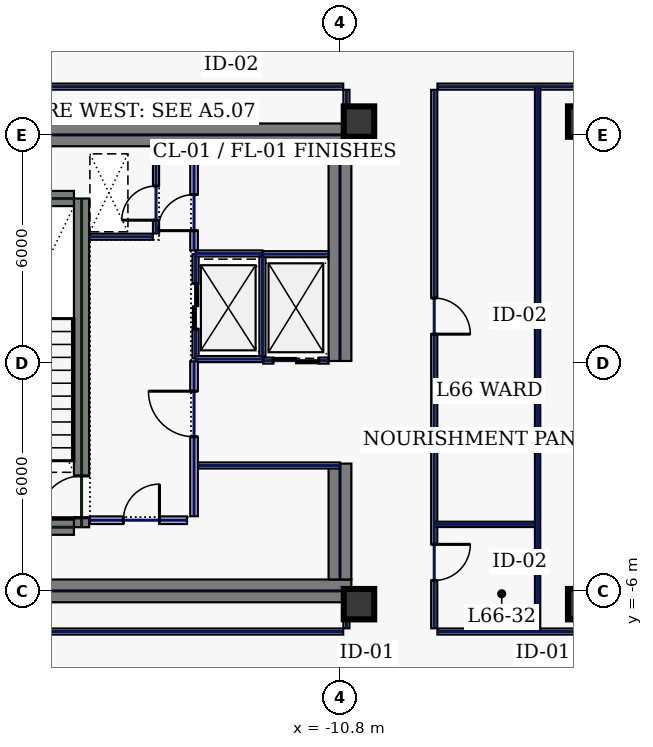
"""IFC4 building model, lengths in metres.
Left out: names, types, materials, properties, quantities, classifications, styles, units other than length and angle.
Written with IfcOpenShell. Run it as: python <this file> out.ifc"""

import sys

from ifc_helpers import new_model, si_unit, direction, frame, frame_2d, origin, origin_2d, place, context, subcontext, project, spatial, rectangle, hollow_rectangle, extrude, element, fill, save


model = new_model("IFC4")
c1 = context("Model", 3, precision=1e-05, world=origin(), true_north=direction((0.0, 1.0)))
c2 = subcontext(c1, "Body", "Model", "MODEL_VIEW")
j1 = project(units=[si_unit("LENGTHUNIT", "METRE"), si_unit("PLANEANGLEUNIT", "RADIAN")], contexts=[c1])
p1 = place(None, origin())
s1 = spatial("IfcSite", under=j1, at=p1, CompositionType="ELEMENT")
p2 = place(p1, origin())
s2 = spatial("IfcBuilding", under=s1, at=p2, CompositionType="ELEMENT")
p3 = place(p2, frame((0.0, 0.0, 285.0)))
s3 = spatial("IfcBuildingStorey", under=s2, at=p3, CompositionType="ELEMENT", Elevation=285.0)
for number, where, z_axis, x_axis in (
    (1, (-22.0, 6.0, 0.0), (0.0, 0.0, 1.0), (1.0, 0.0, 0.0)),
    (2, (-22.0, -6.0, 0.0), (0.0, 0.0, 1.0), (1.0, 0.0, 0.0)),
):
    element("IfcWall", number, at=place(p3, frame(where, z_axis=z_axis, x_axis=x_axis)), inside=s3, PredefinedType="SHEAR", context=c2, shape_type="SweptSolid", body=[
        extrude(rectangle(XDim=11.5, YDim=0.6, at=frame_2d((5.75, 0.0))), origin(), (0.0, 0.0, 1.0), 3.74),
    ])
p4 = place(p3, frame((-10.8, -5.7, 0.0), z_axis=(0.0, 0.0, 1.0), x_axis=(0.0, 1.0, 0.0)))
e3 = element("IfcWall", 3, at=p4, inside=s3, PredefinedType="SHEAR", context=c2, shape_type="SweptSolid", body=[
    extrude(rectangle(XDim=3.05, YDim=0.6, at=frame_2d((1.525, 0.0))), origin(), (0.0, 0.0, 1.0), 3.74),
])
p5 = place(p3, frame((-10.8, 0.05, 0.0), z_axis=(0.0, 0.0, 1.0), x_axis=(0.0, 1.0, 0.0)))
e4 = element("IfcWall", 4, at=p5, inside=s3, PredefinedType="SHEAR", context=c2, shape_type="SweptSolid", body=[
    extrude(rectangle(XDim=5.65, YDim=0.6, at=frame_2d((2.825, 0.0))), origin(), (0.0, 0.0, 1.0), 3.74),
])
p6 = place(p3, frame((-17.6, -4.325, 0.0), z_axis=(0.0, 0.0, 1.0), x_axis=(0.0, 1.0, 0.0)))
e5 = element("IfcWall", 5, at=p6, inside=s3, PredefinedType="SHEAR", context=c2, shape_type="SweptSolid", body=[
    extrude(rectangle(XDim=8.65, YDim=0.4, at=frame_2d((4.325, 0.0))), origin(), (0.0, 0.0, 1.0), 3.74),
])
p7 = place(p6, frame((0.25, 0.0, 0.0)))
e6 = element("IfcOpeningElement", 6, at=p7, cuts=e5, PredefinedType="OPENING", context=c2, shape_type="SweptSolid", body=[
    extrude(rectangle(XDim=1.1, YDim=2.2, at=frame_2d((0.55, 1.1))), frame((0.0, 0.21, 0.0), z_axis=(0.0, -1.0, 0.0), x_axis=(1.0, 0.0, 0.0)), (0.0, 0.0, 1.0), 0.42),
])
for number, where, z_axis, x_axis in (
    (7, (-21.2, -4.325, 0.0), (0.0, 0.0, 1.0), (1.0, 0.0, 0.0)),
    (8, (-21.2, 4.325, 0.0), (0.0, 0.0, 1.0), (1.0, 0.0, 0.0)),
):
    element("IfcWall", number, at=place(p3, frame(where, z_axis=z_axis, x_axis=x_axis)), inside=s3, PredefinedType="SHEAR", context=c2, shape_type="SweptSolid", body=[
        extrude(rectangle(XDim=3.4, YDim=0.4, at=frame_2d((1.7, 0.0))), origin(), (0.0, 0.0, 1.0), 3.74),
    ])
for number, where, z_axis, x_axis in (
    (9, (-10.3, -6.35, 0.0), (0.0, 0.0, 1.0), (1.0, 0.0, 0.0)),
    (10, (-10.3, 6.35, 0.0), (0.0, 0.0, 1.0), (1.0, 0.0, 0.0)),
    (11, (-4.4, -6.35, 0.0), (0.0, 0.0, 1.0), (1.0, 0.0, 0.0)),
    (12, (-4.4, 6.35, 0.0), (0.0, 0.0, 1.0), (1.0, 0.0, 0.0)),
):
    element("IfcColumn", number, at=place(p3, frame(where, z_axis=z_axis, x_axis=x_axis)), inside=s3, PredefinedType="COLUMN", context=c2, shape_type="SweptSolid", body=[
        extrude(hollow_rectangle(XDim=0.8, YDim=0.8, WallThickness=0.036, at=origin_2d()), origin(), (0.0, 0.0, 1.0), 3.74),
    ])
p8 = place(p3, frame((-14.6, 0.12, 0.0), z_axis=(0.0, 0.0, 1.0), x_axis=(0.0, 1.0, 0.0)))
e13 = element("IfcWall", 13, at=p8, inside=s3, PredefinedType="PARTITIONING", context=c2, shape_type="SweptSolid", body=[
    extrude(rectangle(XDim=2.74, YDim=0.16, at=frame_2d((1.37, 0.0))), origin(), (0.0, 0.0, 1.0), 3.74),
])
p9 = place(p8, frame((0.77, 0.0, 0.0)))
e14 = element("IfcOpeningElement", 14, at=p9, cuts=e13, PredefinedType="OPENING", context=c2, shape_type="SweptSolid", body=[
    extrude(rectangle(XDim=1.2, YDim=2.2, at=frame_2d((0.6, 1.1))), frame((0.0, 0.09, 0.0), z_axis=(0.0, -1.0, 0.0), x_axis=(1.0, 0.0, 0.0)), (0.0, 0.0, 1.0), 0.18),
])
for number, where, z_axis, x_axis in (
    (15, (-14.6, 0.1, 0.0), (0.0, 0.0, 1.0), (1.0, 0.0, 0.0)),
    (16, (-14.6, 2.88, 0.0), (0.0, 0.0, 1.0), (1.0, 0.0, 0.0)),
):
    element("IfcWall", number, at=place(p3, frame(where, z_axis=z_axis, x_axis=x_axis)), inside=s3, PredefinedType="PARTITIONING", context=c2, shape_type="SweptSolid", body=[
        extrude(rectangle(XDim=1.76, YDim=0.16, at=frame_2d((0.88, 0.0))), origin(), (0.0, 0.0, 1.0), 3.74),
    ])
p10 = place(p3, frame((-12.84, 0.18, 0.0), z_axis=(0.0, 0.0, 1.0), x_axis=(0.0, 1.0, 0.0)))
e17 = element("IfcWall", 17, at=p10, inside=s3, PredefinedType="PARTITIONING", context=c2, shape_type="SweptSolid", body=[
    extrude(rectangle(XDim=2.62, YDim=0.16, at=frame_2d((1.31, 0.0))), origin(), (0.0, 0.0, 1.0), 3.74),
])
p11 = place(p3, frame((-12.82, 0.06, 0.0), z_axis=(0.0, 0.0, 1.0), x_axis=(1.0, 0.0, 0.0)))
e18 = element("IfcWall", 18, at=p11, inside=s3, PredefinedType="PARTITIONING", context=c2, shape_type="SweptSolid", body=[
    extrude(rectangle(XDim=1.72, YDim=0.16, at=frame_2d((0.86, 0.0))), origin(), (0.0, 0.0, 1.0), 3.74),
])
p12 = place(p11, frame((0.26, 0.0, 0.0)))
e19 = element("IfcOpeningElement", 19, at=p12, cuts=e18, PredefinedType="OPENING", context=c2, shape_type="SweptSolid", body=[
    extrude(rectangle(XDim=1.2, YDim=2.2, at=frame_2d((0.6, 1.1))), frame((0.0, 0.09, 0.0), z_axis=(0.0, -1.0, 0.0), x_axis=(1.0, 0.0, 0.0)), (0.0, 0.0, 1.0), 0.18),
])
p13 = place(p3, frame((-12.82, 2.86, 0.0), z_axis=(0.0, 0.0, 1.0), x_axis=(1.0, 0.0, 0.0)))
e20 = element("IfcWall", 20, at=p13, inside=s3, PredefinedType="PARTITIONING", context=c2, shape_type="SweptSolid", body=[
    extrude(rectangle(XDim=1.72, YDim=0.16, at=frame_2d((0.86, 0.0))), origin(), (0.0, 0.0, 1.0), 3.74),
])
p14 = place(p3, frame((-15.64, 3.405, 0.0), z_axis=(0.0, 0.0, 1.0), x_axis=(0.0, 1.0, 0.0)))
e21 = element("IfcWall", 21, at=p14, inside=s3, PredefinedType="PARTITIONING", context=c2, shape_type="SweptSolid", body=[
    extrude(rectangle(XDim=2.155, YDim=0.16, at=frame_2d((1.078, 0.0))), origin(), (0.0, 0.0, 1.0), 3.74),
])
p15 = place(p14, frame((0.35, 0.0, 0.0)))
e22 = element("IfcOpeningElement", 22, at=p15, cuts=e21, PredefinedType="OPENING", context=c2, shape_type="SweptSolid", body=[
    extrude(rectangle(XDim=0.9, YDim=2.2, at=frame_2d((0.45, 1.1))), frame((0.0, 0.09, 0.0), z_axis=(0.0, -1.0, 0.0), x_axis=(1.0, 0.0, 0.0)), (0.0, 0.0, 1.0), 0.18),
])
p16 = place(p3, frame((-17.38, 3.32, 0.0), z_axis=(0.0, 0.0, 1.0), x_axis=(1.0, 0.0, 0.0)))
e23 = element("IfcWall", 23, at=p16, inside=s3, PredefinedType="PARTITIONING", context=c2, shape_type="SweptSolid", body=[
    extrude(rectangle(XDim=1.655, YDim=0.16, at=frame_2d((0.827, 0.0))), origin(), (0.0, 0.0, 1.0), 3.74),
])
p17 = place(p3, frame((-17.38, -4.14, 0.0), z_axis=(0.0, 0.0, 1.0), x_axis=(1.0, 0.0, 0.0)))
e24 = element("IfcWall", 24, at=p17, inside=s3, PredefinedType="SOLIDWALL", context=c2, shape_type="SweptSolid", body=[
    extrude(rectangle(XDim=2.555, YDim=0.2, at=frame_2d((1.277, 0.0))), origin(), (0.0, 0.0, 1.0), 3.74),
])
p18 = place(p17, frame((0.88, 0.0, 0.0)))
e25 = element("IfcOpeningElement", 25, at=p18, cuts=e24, PredefinedType="OPENING", context=c2, shape_type="SweptSolid", body=[
    extrude(rectangle(XDim=0.95, YDim=2.2, at=frame_2d((0.475, 1.1))), frame((0.0, 0.11, 0.0), z_axis=(0.0, -1.0, 0.0), x_axis=(1.0, 0.0, 0.0)), (0.0, 0.0, 1.0), 0.22),
])
p19 = place(p3, frame((-14.535, -2.7, 0.0), z_axis=(0.0, 0.0, 1.0), x_axis=(1.0, 0.0, 0.0)))
e26 = element("IfcWall", 26, at=p19, inside=s3, PredefinedType="PARTITIONING", context=c2, shape_type="SweptSolid", body=[
    extrude(rectangle(XDim=3.735, YDim=0.16, at=frame_2d((1.867, 0.0))), origin(), (0.0, 0.0, 1.0), 3.74),
])
p20 = place(p3, frame((-14.64, 2.96, 0.0), z_axis=(0.0, 0.0, 1.0), x_axis=(0.0, 1.0, 0.0)))
e27 = element("IfcWall", 27, at=p20, inside=s3, PredefinedType="SOLIDWALL", context=c2, shape_type="SweptSolid", body=[
    extrude(rectangle(XDim=2.6, YDim=0.2, at=frame_2d((1.3, 0.0))), origin(), (0.0, 0.0, 1.0), 3.74),
])
p21 = place(p20, frame((0.52, 0.0, 0.0)))
e28 = element("IfcOpeningElement", 28, at=p21, cuts=e27, PredefinedType="OPENING", context=c2, shape_type="SweptSolid", body=[
    extrude(rectangle(XDim=0.95, YDim=2.2, at=frame_2d((0.475, 1.1))), frame((0.0, 0.11, 0.0), z_axis=(0.0, -1.0, 0.0), x_axis=(1.0, 0.0, 0.0)), (0.0, 0.0, 1.0), 0.22),
])
p22 = place(p3, frame((-14.64, -4.035, 0.0), z_axis=(0.0, 0.0, 1.0), x_axis=(0.0, 1.0, 0.0)))
e29 = element("IfcWall", 29, at=p22, inside=s3, PredefinedType="SOLIDWALL", context=c2, shape_type="SweptSolid", body=[
    extrude(rectangle(XDim=4.075, YDim=0.2, at=frame_2d((2.038, 0.0))), origin(), (0.0, 0.0, 1.0), 3.74),
])
p23 = place(p22, frame((2.09, 0.0, 0.0)))
e30 = element("IfcOpeningElement", 30, at=p23, cuts=e29, PredefinedType="OPENING", context=c2, shape_type="SweptSolid", body=[
    extrude(rectangle(XDim=1.2, YDim=2.2, at=frame_2d((0.6, 1.1))), frame((0.0, 0.11, 0.0), z_axis=(0.0, -1.0, 0.0), x_axis=(1.0, 0.0, 0.0)), (0.0, 0.0, 1.0), 0.22),
])
p24 = place(p3, frame((-3.965, 7.27, 0.0), z_axis=(0.0, 0.0, 1.0), x_axis=(-1.0, 0.0, 0.0)))
e31 = element("IfcWall", 31, at=p24, inside=s3, PredefinedType="PARTITIONING", context=c2, shape_type="SweptSolid", body=[
    extrude(rectangle(XDim=4.27, YDim=0.16, at=frame_2d((2.135, 0.0))), origin(), (0.0, 0.0, 1.0), 3.74),
])
p25 = place(p3, frame((-8.32, 7.185, 0.0), z_axis=(0.0, 0.0, 1.0), x_axis=(0.0, -1.0, 0.0)))
e32 = element("IfcWall", 32, at=p25, inside=s3, PredefinedType="PARTITIONING", context=c2, shape_type="SweptSolid", body=[
    extrude(rectangle(XDim=14.17, YDim=0.16, at=frame_2d((7.085, 0.0))), origin(), (0.0, 0.0, 1.0), 3.74),
])
p26 = place(p25, frame((11.961, 0.0, 0.0)))
e33 = element("IfcOpeningElement", 33, at=p26, cuts=e32, PredefinedType="OPENING", context=c2, shape_type="SweptSolid", body=[
    extrude(rectangle(XDim=0.95, YDim=2.2, at=frame_2d((0.475, 1.1))), frame((0.0, 0.09, 0.0), z_axis=(0.0, -1.0, 0.0), x_axis=(1.0, 0.0, 0.0)), (0.0, 0.0, 1.0), 0.18),
])
p27 = place(p25, frame((5.479, 0.0, 0.0)))
e34 = element("IfcOpeningElement", 34, at=p27, cuts=e32, PredefinedType="OPENING", context=c2, shape_type="SweptSolid", body=[
    extrude(rectangle(XDim=0.95, YDim=2.2, at=frame_2d((0.475, 1.1))), frame((0.0, 0.09, 0.0), z_axis=(0.0, -1.0, 0.0), x_axis=(1.0, 0.0, 0.0)), (0.0, 0.0, 1.0), 0.18),
])
p28 = place(p3, frame((-8.235, -7.07, 0.0), z_axis=(0.0, 0.0, 1.0), x_axis=(1.0, 0.0, 0.0)))
e35 = element("IfcWall", 35, at=p28, inside=s3, PredefinedType="PARTITIONING", context=c2, shape_type="SweptSolid", body=[
    extrude(rectangle(XDim=4.27, YDim=0.16, at=frame_2d((2.135, 0.0))), origin(), (0.0, 0.0, 1.0), 3.74),
])
p29 = place(p3, frame((-10.63, -6.985, 0.0), z_axis=(0.0, 0.0, 1.0), x_axis=(0.0, 1.0, 0.0)))
e36 = element("IfcWall", 36, at=p29, inside=s3, PredefinedType="PARTITIONING", context=c2, shape_type="SweptSolid", body=[
    extrude(rectangle(XDim=0.565, YDim=0.16, at=frame_2d((0.283, 0.0))), origin(), (0.0, 0.0, 1.0), 3.74),
])
p30 = place(p3, frame((-10.63, 6.42, 0.0), z_axis=(0.0, 0.0, 1.0), x_axis=(0.0, 1.0, 0.0)))
e37 = element("IfcWall", 37, at=p30, inside=s3, PredefinedType="PARTITIONING", context=c2, shape_type="SweptSolid", body=[
    extrude(rectangle(XDim=0.765, YDim=0.16, at=frame_2d((0.383, 0.0))), origin(), (0.0, 0.0, 1.0), 3.74),
])
for number, where, z_axis, x_axis in (
    (38, (-10.715, 7.27, 0.0), (0.0, 0.0, 1.0), (-1.0, 0.0, 0.0)),
    (39, (-21.915, -7.07, 0.0), (0.0, 0.0, 1.0), (1.0, 0.0, 0.0)),
):
    element("IfcWall", number, at=place(p3, frame(where, z_axis=z_axis, x_axis=x_axis)), inside=s3, PredefinedType="PARTITIONING", context=c2, shape_type="SweptSolid", body=[
        extrude(rectangle(XDim=11.2, YDim=0.16, at=frame_2d((5.6, 0.0))), origin(), (0.0, 0.0, 1.0), 3.74),
    ])
p31 = place(p3, frame((-5.6, -7.065, 0.0), z_axis=(0.0, 0.0, 1.0), x_axis=(0.0, 1.0, 0.0)))
e40 = element("IfcWall", 40, at=p31, inside=s3, PredefinedType="PARTITIONING", context=c2, shape_type="SweptSolid", body=[
    extrude(rectangle(XDim=14.33, YDim=0.14, at=frame_2d((7.165, 0.0))), origin(), (0.0, 0.0, 1.0), 3.74),
])
p32 = place(p3, frame((-8.315, -4.25, 0.0), z_axis=(0.0, 0.0, 1.0), x_axis=(1.0, 0.0, 0.0)))
e41 = element("IfcWall", 41, at=p32, inside=s3, PredefinedType="PARTITIONING", context=c2, shape_type="SweptSolid", body=[
    extrude(rectangle(XDim=2.64, YDim=0.14, at=frame_2d((1.32, 0.0))), origin(), (0.0, 0.0, 1.0), 3.74),
])
p33 = place(p7, origin())
e42 = element("IfcDoor", 42, at=p33, inside=s3, OperationType="SINGLE_SWING_LEFT", PredefinedType="DOOR", context=c2, shape_type="SweptSolid", body=[
    extrude(rectangle(XDim=1.1, YDim=2.2, at=frame_2d((0.55, 1.1))), frame((0.0, 0.025, 0.0), z_axis=(0.0, -1.0, 0.0), x_axis=(1.0, 0.0, 0.0)), (0.0, 0.0, 1.0), 0.05),
])
fill(e6, e42)
p34 = place(p9, origin())
e43 = element("IfcDoor", 43, at=p34, inside=s3, OperationType="SLIDING_TO_LEFT", PredefinedType="DOOR", context=c2, shape_type="SweptSolid", body=[
    extrude(rectangle(XDim=1.2, YDim=2.2, at=frame_2d((0.6, 1.1))), frame((0.0, 0.025, 0.0), z_axis=(0.0, -1.0, 0.0), x_axis=(1.0, 0.0, 0.0)), (0.0, 0.0, 1.0), 0.05),
])
fill(e14, e43)
p35 = place(p12, origin())
e44 = element("IfcDoor", 44, at=p35, inside=s3, OperationType="SLIDING_TO_LEFT", PredefinedType="DOOR", context=c2, shape_type="SweptSolid", body=[
    extrude(rectangle(XDim=1.2, YDim=2.2, at=frame_2d((0.6, 1.1))), frame((0.0, 0.025, 0.0), z_axis=(0.0, -1.0, 0.0), x_axis=(1.0, 0.0, 0.0)), (0.0, 0.0, 1.0), 0.05),
])
fill(e19, e44)
p36 = place(p15, origin())
e45 = element("IfcDoor", 45, at=p36, inside=s3, OperationType="SINGLE_SWING_LEFT", PredefinedType="DOOR", context=c2, shape_type="SweptSolid", body=[
    extrude(rectangle(XDim=0.9, YDim=2.2, at=frame_2d((0.45, 1.1))), frame((0.0, 0.025, 0.0), z_axis=(0.0, -1.0, 0.0), x_axis=(1.0, 0.0, 0.0)), (0.0, 0.0, 1.0), 0.05),
])
fill(e22, e45)
p37 = place(p18, origin())
e46 = element("IfcDoor", 46, at=p37, inside=s3, OperationType="SINGLE_SWING_RIGHT", PredefinedType="DOOR", context=c2, shape_type="SweptSolid", body=[
    extrude(rectangle(XDim=0.95, YDim=2.2, at=frame_2d((0.475, 1.1))), frame((0.0, 0.025, 0.0), z_axis=(0.0, -1.0, 0.0), x_axis=(1.0, 0.0, 0.0)), (0.0, 0.0, 1.0), 0.05),
])
fill(e25, e46)
p38 = place(p21, origin())
e47 = element("IfcDoor", 47, at=p38, inside=s3, OperationType="SINGLE_SWING_LEFT", PredefinedType="DOOR", context=c2, shape_type="SweptSolid", body=[
    extrude(rectangle(XDim=0.95, YDim=2.2, at=frame_2d((0.475, 1.1))), frame((0.0, 0.025, 0.0), z_axis=(0.0, -1.0, 0.0), x_axis=(1.0, 0.0, 0.0)), (0.0, 0.0, 1.0), 0.05),
])
fill(e28, e47)
p39 = place(p23, origin())
e48 = element("IfcDoor", 48, at=p39, inside=s3, OperationType="SINGLE_SWING_RIGHT", PredefinedType="DOOR", context=c2, shape_type="SweptSolid", body=[
    extrude(rectangle(XDim=1.2, YDim=2.2, at=frame_2d((0.6, 1.1))), frame((0.0, 0.025, 0.0), z_axis=(0.0, -1.0, 0.0), x_axis=(1.0, 0.0, 0.0)), (0.0, 0.0, 1.0), 0.05),
])
fill(e30, e48)
p40 = place(p26, origin())
e49 = element("IfcDoor", 49, at=p40, inside=s3, OperationType="SINGLE_SWING_LEFT", PredefinedType="DOOR", context=c2, shape_type="SweptSolid", body=[
    extrude(rectangle(XDim=0.95, YDim=2.2, at=frame_2d((0.475, 1.1))), frame((0.0, 0.025, 0.0), z_axis=(0.0, -1.0, 0.0), x_axis=(1.0, 0.0, 0.0)), (0.0, 0.0, 1.0), 0.05),
])
fill(e33, e49)
p41 = place(p27, origin())
e50 = element("IfcDoor", 50, at=p41, inside=s3, OperationType="SINGLE_SWING_RIGHT", PredefinedType="DOOR", context=c2, shape_type="SweptSolid", body=[
    extrude(rectangle(XDim=0.95, YDim=2.2, at=frame_2d((0.475, 1.1))), frame((0.0, 0.025, 0.0), z_axis=(0.0, -1.0, 0.0), x_axis=(1.0, 0.0, 0.0)), (0.0, 0.0, 1.0), 0.05),
])
fill(e34, e50)
save(model, sys.argv[1])
